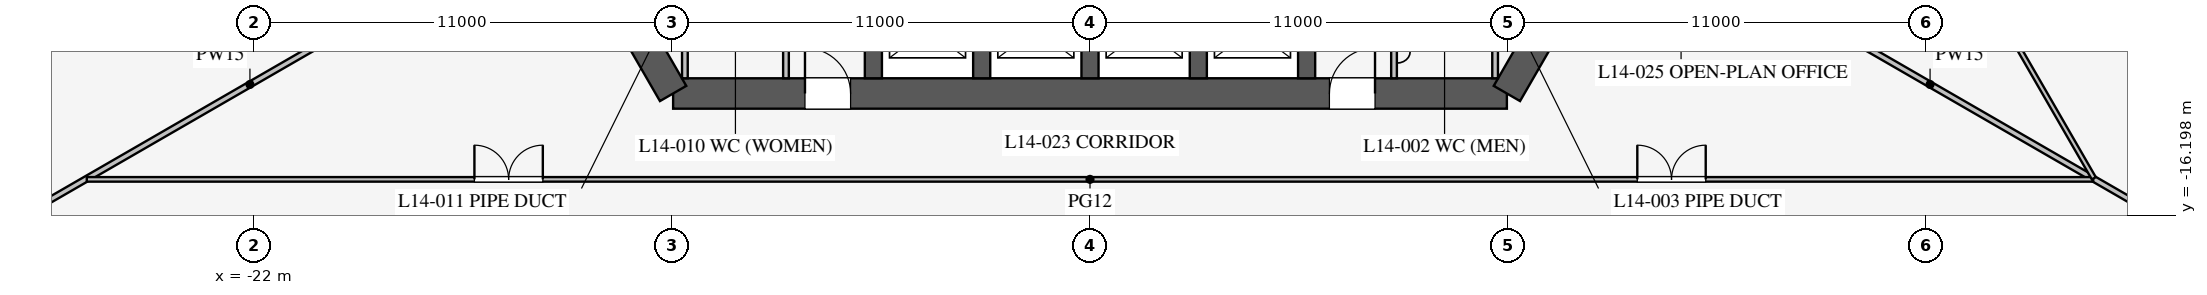
"""IFC4 building model, lengths in metres.
Left out: names, types, materials, properties, quantities, classifications, styles, units other than length and angle.
Written with IfcOpenShell. Run it as: python <this file> out.ifc"""

import sys

from ifc_helpers import new_model, si_unit, direction, frame, frame_2d, origin, place, context, subcontext, project, spatial, rectangle, extrude, element, fill, save


model = new_model("IFC4")
c1 = context("Model", 3, precision=1e-05, world=origin(), true_north=direction((0.0, 1.0)))
c2 = subcontext(c1, "Body", "Model", "MODEL_VIEW")
j1 = project(units=[si_unit("LENGTHUNIT", "METRE"), si_unit("PLANEANGLEUNIT", "RADIAN")], contexts=[c1])
p1 = place(None, origin())
s1 = spatial("IfcSite", under=j1, at=p1, CompositionType="ELEMENT")
p2 = place(p1, origin())
s2 = spatial("IfcBuilding", under=s1, at=p2, CompositionType="ELEMENT")
p3 = place(p2, frame((0.0, 0.0, 62.7)))
s3 = spatial("IfcBuildingStorey", under=s2, at=p3, CompositionType="ELEMENT", Elevation=62.7)
p4 = place(p3, frame((-10.97, -13.0, 0.0), z_axis=(0.0, 0.0, 1.0), x_axis=(1.0, 0.0, 0.0)))
e1 = element("IfcWall", 1, at=p4, inside=s3, PredefinedType="SHEAR", context=c2, shape_type="SweptSolid", body=[
    extrude(rectangle(XDim=21.939, YDim=0.8, at=frame_2d((10.97, 0.0))), origin(), (0.0, 0.0, 1.0), 4.2),
])
p5 = place(p4, frame((17.27, 0.0, 0.0)))
e2 = element("IfcOpeningElement", 2, at=p5, cuts=e1, PredefinedType="OPENING", context=c2, shape_type="SweptSolid", body=[
    extrude(rectangle(XDim=1.2, YDim=2.1, at=frame_2d((0.6, 1.05))), frame((0.0, 0.41, 0.0), z_axis=(0.0, -1.0, 0.0), x_axis=(1.0, 0.0, 0.0)), (0.0, 0.0, 1.0), 0.82),
])
p6 = place(p4, frame((3.47, 0.0, 0.0)))
e3 = element("IfcOpeningElement", 3, at=p6, cuts=e1, PredefinedType="OPENING", context=c2, shape_type="SweptSolid", body=[
    extrude(rectangle(XDim=1.2, YDim=2.1, at=frame_2d((0.6, 1.05))), frame((0.0, 0.41, 0.0), z_axis=(0.0, -1.0, 0.0), x_axis=(1.0, 0.0, 0.0)), (0.0, 0.0, 1.0), 0.82),
])
for number, where, z_axis, x_axis in (
    (4, (10.97, -13.0, 0.0), (0.0, 0.0, 1.0), (0.5, 0.866, 0.0)),
    (5, (-16.743, -3.0, 0.0), (0.0, 0.0, 1.0), (0.5, -0.866, 0.0)),
):
    element("IfcWall", number, at=place(p3, frame(where, z_axis=z_axis, x_axis=x_axis)), inside=s3, PredefinedType="SHEAR", context=c2, shape_type="SweptSolid", body=[
        extrude(rectangle(XDim=11.547, YDim=0.8, at=frame_2d((5.773, 0.0))), origin(), (0.0, 0.0, 1.0), 4.2),
    ])
for number, where, z_axis, x_axis in (
    (6, (-5.7, -10.025, 0.0), (0.0, 0.0, 1.0), (0.0, -1.0, 0.0)),
    (7, (-2.85, -10.025, 0.0), (0.0, 0.0, 1.0), (0.0, -1.0, 0.0)),
    (8, (0.0, -10.025, 0.0), (0.0, 0.0, 1.0), (0.0, -1.0, 0.0)),
    (9, (2.85, -10.025, 0.0), (0.0, 0.0, 1.0), (0.0, -1.0, 0.0)),
    (10, (5.7, -10.025, 0.0), (0.0, 0.0, 1.0), (0.0, -1.0, 0.0)),
):
    element("IfcWall", number, at=place(p3, frame(where, z_axis=z_axis, x_axis=x_axis)), inside=s3, PredefinedType="SHEAR", context=c2, shape_type="SweptSolid", body=[
        extrude(rectangle(XDim=2.575, YDim=0.45, at=frame_2d((1.288, 0.0))), origin(), (0.0, 0.0, 1.0), 4.2),
    ])
p7 = place(p3, frame((8.0, -7.5, 0.0), z_axis=(0.0, 0.0, 1.0), x_axis=(0.0, -1.0, 0.0)))
e11 = element("IfcWall", 11, at=p7, inside=s3, PredefinedType="PARTITIONING", context=c2, shape_type="SweptSolid", body=[
    extrude(rectangle(XDim=5.1, YDim=0.15, at=frame_2d((2.55, 0.0))), origin(), (0.0, 0.0, 1.0), 4.0),
])
p8 = place(p7, frame((1.3, 0.0, 0.0)))
e12 = element("IfcOpeningElement", 12, at=p8, cuts=e11, PredefinedType="OPENING", context=c2, shape_type="SweptSolid", body=[
    extrude(rectangle(XDim=0.9, YDim=2.1, at=frame_2d((0.45, 1.05))), frame((0.0, 0.085, 0.0), z_axis=(0.0, -1.0, 0.0), x_axis=(1.0, 0.0, 0.0)), (0.0, 0.0, 1.0), 0.17),
])
p9 = place(p3, frame((-8.0, -7.5, 0.0), z_axis=(0.0, 0.0, 1.0), x_axis=(0.0, -1.0, 0.0)))
e13 = element("IfcWall", 13, at=p9, inside=s3, PredefinedType="PARTITIONING", context=c2, shape_type="SweptSolid", body=[
    extrude(rectangle(XDim=5.1, YDim=0.15, at=frame_2d((2.55, 0.0))), origin(), (0.0, 0.0, 1.0), 4.0),
])
p10 = place(p9, frame((2.6, 0.0, 0.0)))
e14 = element("IfcOpeningElement", 14, at=p10, cuts=e13, PredefinedType="OPENING", context=c2, shape_type="SweptSolid", body=[
    extrude(rectangle(XDim=0.9, YDim=2.1, at=frame_2d((0.45, 1.05))), frame((0.0, 0.085, 0.0), z_axis=(0.0, -1.0, 0.0), x_axis=(1.0, 0.0, 0.0)), (0.0, 0.0, 1.0), 0.17),
])
for number, where, z_axis, x_axis in (
    (15, (10.66, -8.5, 0.0), (0.0, 0.0, 1.0), (0.0, -1.0, 0.0)),
    (16, (-10.66, -8.5, 0.0), (0.0, 0.0, 1.0), (0.0, -1.0, 0.0)),
):
    element("IfcWall", number, at=place(p3, frame(where, z_axis=z_axis, x_axis=x_axis)), inside=s3, PredefinedType="PARTITIONING", context=c2, shape_type="SweptSolid", body=[
        extrude(rectangle(XDim=4.1, YDim=0.15, at=frame_2d((2.05, 0.0))), origin(), (0.0, 0.0, 1.0), 4.0),
    ])
for number, where, z_axis, x_axis in (
    (17, (14.203, -8.2, 0.0), (0.0, 0.0, 1.0), (0.866, -0.5, 0.0)),
    (18, (-14.203, -8.2, 0.0), (0.0, 0.0, 1.0), (-0.866, -0.5, 0.0)),
):
    element("IfcWall", number, at=place(p3, frame(where, z_axis=z_axis, x_axis=x_axis)), inside=s3, PredefinedType="PARTITIONING", context=c2, shape_type="SweptSolid", body=[
        extrude(rectangle(XDim=18.25, YDim=0.15, at=frame_2d((9.125, 0.0))), origin(), (0.0, 0.0, 1.0), 2.3),
    ])
p11 = place(p3, frame((-26.398, -15.26, 0.0), z_axis=(0.0, 0.0, 1.0), x_axis=(1.0, 0.0, 0.0)))
e19 = element("IfcWall", 19, at=p11, inside=s3, PredefinedType="PARTITIONING", context=c2, shape_type="SweptSolid", body=[
    extrude(rectangle(XDim=52.796, YDim=0.12, at=frame_2d((26.398, 0.0))), origin(), (0.0, 0.0, 1.0), 2.9),
])
p12 = place(p11, frame((10.2, 0.0, 0.15)))
e20 = element("IfcOpeningElement", 20, at=p12, cuts=e19, PredefinedType="OPENING", context=c2, shape_type="SweptSolid", body=[
    extrude(rectangle(XDim=1.8, YDim=2.1, at=frame_2d((0.9, 1.05))), frame((0.0, 0.07, 0.0), z_axis=(0.0, -1.0, 0.0), x_axis=(1.0, 0.0, 0.0)), (0.0, 0.0, 1.0), 0.14),
])
p13 = place(p11, frame((40.8, 0.0, 0.15)))
e21 = element("IfcOpeningElement", 21, at=p13, cuts=e19, PredefinedType="OPENING", context=c2, shape_type="SweptSolid", body=[
    extrude(rectangle(XDim=1.8, YDim=2.1, at=frame_2d((0.9, 1.05))), frame((0.0, 0.07, 0.0), z_axis=(0.0, -1.0, 0.0), x_axis=(1.0, 0.0, 0.0)), (0.0, 0.0, 1.0), 0.14),
])
p14 = place(p3, frame((26.415, -15.231, 0.0), z_axis=(0.0, 0.0, 1.0), x_axis=(-0.50000091641, 0.866024874695, 0.0)))
e22 = element("IfcWall", 22, at=p14, inside=s3, PredefinedType="PARTITIONING", context=c2, shape_type="SweptSolid", body=[
    extrude(rectangle(XDim=52.796, YDim=0.12, at=frame_2d((26.398, 0.0))), origin(), (0.0, 0.0, 1.0), 2.9),
])
p15 = place(p14, frame((10.2, 0.0, 0.15)))
e23 = element("IfcOpeningElement", 23, at=p15, cuts=e22, PredefinedType="OPENING", context=c2, shape_type="SweptSolid", body=[
    extrude(rectangle(XDim=1.8, YDim=2.1, at=frame_2d((0.9, 1.05))), frame((0.0, 0.07, 0.0), z_axis=(0.0, -1.0, 0.0), x_axis=(1.0, 0.0, 0.0)), (0.0, 0.0, 1.0), 0.14),
])
p16 = place(p14, frame((40.8, 0.0, 0.15)))
e24 = element("IfcOpeningElement", 24, at=p16, cuts=e22, PredefinedType="OPENING", context=c2, shape_type="SweptSolid", body=[
    extrude(rectangle(XDim=1.8, YDim=2.1, at=frame_2d((0.9, 1.05))), frame((0.0, 0.07, 0.0), z_axis=(0.0, -1.0, 0.0), x_axis=(1.0, 0.0, 0.0)), (0.0, 0.0, 1.0), 0.14),
])
p17 = place(p5, origin())
e25 = element("IfcDoor", 25, at=p17, inside=s3, OperationType="SINGLE_SWING_RIGHT", PredefinedType="DOOR", context=c2, shape_type="SweptSolid", body=[
    extrude(rectangle(XDim=1.2, YDim=2.1, at=frame_2d((0.6, 1.05))), frame((0.0, 0.025, 0.0), z_axis=(0.0, -1.0, 0.0), x_axis=(1.0, 0.0, 0.0)), (0.0, 0.0, 1.0), 0.05),
])
fill(e2, e25)
p18 = place(p6, origin())
e26 = element("IfcDoor", 26, at=p18, inside=s3, OperationType="SINGLE_SWING_LEFT", PredefinedType="DOOR", context=c2, shape_type="SweptSolid", body=[
    extrude(rectangle(XDim=1.2, YDim=2.1, at=frame_2d((0.6, 1.05))), frame((0.0, 0.025, 0.0), z_axis=(0.0, -1.0, 0.0), x_axis=(1.0, 0.0, 0.0)), (0.0, 0.0, 1.0), 0.05),
])
fill(e3, e26)
p19 = place(p12, origin())
e27 = element("IfcDoor", 27, at=p19, inside=s3, OperationType="DOUBLE_DOOR_SINGLE_SWING", PredefinedType="DOOR", context=c2, shape_type="SweptSolid", body=[
    extrude(rectangle(XDim=1.8, YDim=2.1, at=frame_2d((0.9, 1.05))), frame((0.0, 0.025, 0.0), z_axis=(0.0, -1.0, 0.0), x_axis=(1.0, 0.0, 0.0)), (0.0, 0.0, 1.0), 0.05),
])
fill(e20, e27)
p20 = place(p13, origin())
e28 = element("IfcDoor", 28, at=p20, inside=s3, OperationType="DOUBLE_DOOR_SINGLE_SWING", PredefinedType="DOOR", context=c2, shape_type="SweptSolid", body=[
    extrude(rectangle(XDim=1.8, YDim=2.1, at=frame_2d((0.9, 1.05))), frame((0.0, 0.025, 0.0), z_axis=(0.0, -1.0, 0.0), x_axis=(1.0, 0.0, 0.0)), (0.0, 0.0, 1.0), 0.05),
])
fill(e21, e28)
save(model, sys.argv[1])
